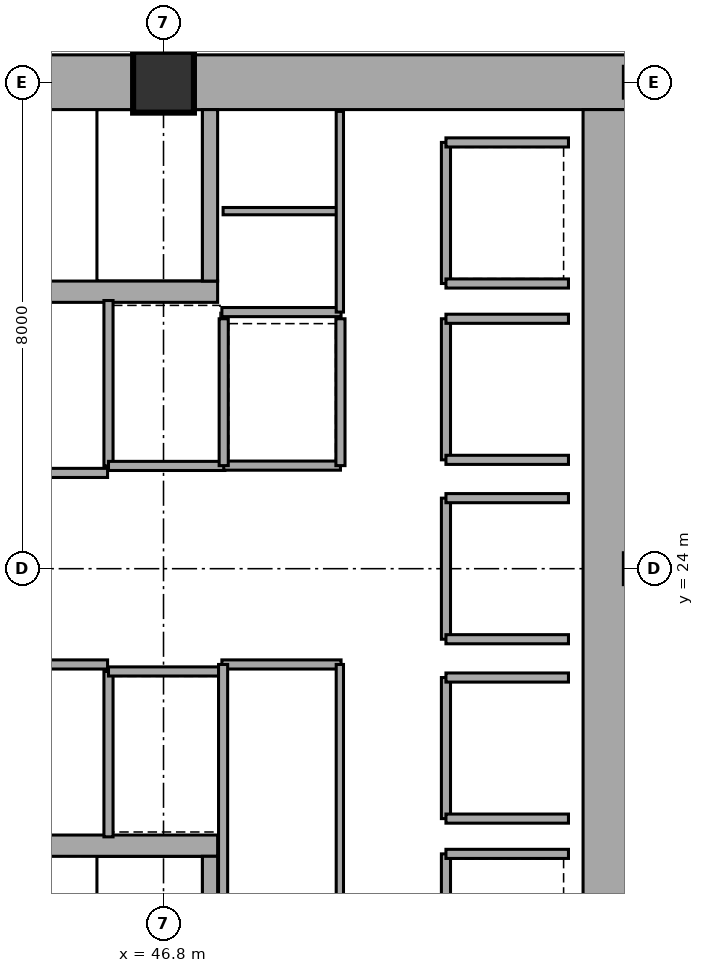
"""IFC4 building model, lengths in metres.
Left out: names, types, materials, properties, quantities, classifications, styles, units other than length and angle.
Written with IfcOpenShell. Run it as: python <this file> out.ifc"""

import sys

from ifc_helpers import new_model, si_unit, direction, frame, frame_2d, origin, origin_2d, place, context, subcontext, project, spatial, rectangle, extrude, element, fill, save


model = new_model("IFC4")
c1 = context("Model", 3, precision=1e-05, world=origin(), true_north=direction((0.0, 1.0)))
c2 = subcontext(c1, "Body", "Model", "MODEL_VIEW")
j1 = project(units=[si_unit("LENGTHUNIT", "METRE"), si_unit("PLANEANGLEUNIT", "RADIAN")], contexts=[c1])
p1 = place(None, origin())
s1 = spatial("IfcSite", under=j1, at=p1, CompositionType="ELEMENT")
p2 = place(p1, origin())
s2 = spatial("IfcBuilding", under=s1, at=p2, CompositionType="ELEMENT")
p3 = place(p2, origin())
s3 = spatial("IfcBuildingStorey", under=s2, at=p3, CompositionType="ELEMENT", Elevation=0.0)
p4 = place(p3, frame((38.8, 32.0, 0.0), z_axis=(0.0, 0.0, 1.0), x_axis=(1.0, 0.0, 0.0)))
e1 = element("IfcWall", 1, at=p4, inside=s3, PredefinedType="SHEAR", context=c2, shape_type="SweptSolid", body=[
    extrude(rectangle(XDim=16.0, YDim=0.9, at=frame_2d((8.0, 0.0))), origin(), (0.0, 0.0, 1.0), 5.12),
])
p5 = place(p3, frame((54.15, 16.45, 0.0), z_axis=(0.0, 0.0, 1.0), x_axis=(0.0, 1.0, 0.0)))
e2 = element("IfcWall", 2, at=p5, inside=s3, PredefinedType="SHEAR", context=c2, shape_type="SweptSolid", body=[
    extrude(rectangle(XDim=15.1, YDim=0.9, at=frame_2d((7.55, 0.0))), origin(), (0.0, 0.0, 1.0), 5.12),
])
p6 = place(p3, frame((39.98, 28.555, 0.0), z_axis=(0.0, 0.0, 1.0), x_axis=(1.0, 0.0, 0.0)))
e3 = element("IfcWall", 3, at=p6, inside=s3, PredefinedType="SHEAR", context=c2, shape_type="SweptSolid", body=[
    extrude(rectangle(XDim=7.71, YDim=0.35, at=frame_2d((3.855, 0.0))), origin(), (0.0, 0.0, 1.0), 5.12),
])
p7 = place(p6, frame((0.25, 0.0, 0.0)))
e4 = element("IfcOpeningElement", 4, at=p7, cuts=e3, PredefinedType="OPENING", context=c2, shape_type="SweptSolid", body=[
    extrude(rectangle(XDim=1.1, YDim=2.15, at=frame_2d((0.55, 1.075))), frame((0.0, 0.185, 0.0), z_axis=(0.0, -1.0, 0.0), x_axis=(1.0, 0.0, 0.0)), (0.0, 0.0, 1.0), 0.37),
])
p8 = place(p3, frame((39.98, 19.445, 0.0), z_axis=(0.0, 0.0, 1.0), x_axis=(1.0, 0.0, 0.0)))
e5 = element("IfcWall", 5, at=p8, inside=s3, PredefinedType="SHEAR", context=c2, shape_type="SweptSolid", body=[
    extrude(rectangle(XDim=7.71, YDim=0.35, at=frame_2d((3.855, 0.0))), origin(), (0.0, 0.0, 1.0), 5.12),
])
p9 = place(p8, frame((0.25, 0.0, 0.0)))
e6 = element("IfcOpeningElement", 6, at=p9, cuts=e5, PredefinedType="OPENING", context=c2, shape_type="SweptSolid", body=[
    extrude(rectangle(XDim=1.1, YDim=2.15, at=frame_2d((0.55, 1.075))), frame((0.0, 0.185, 0.0), z_axis=(0.0, -1.0, 0.0), x_axis=(1.0, 0.0, 0.0)), (0.0, 0.0, 1.0), 0.37),
])
for number, where, z_axis, x_axis in (
    (7, (47.565, 28.73, 0.0), (0.0, 0.0, 1.0), (0.0, 1.0, 0.0)),
    (8, (47.565, 16.45, 0.0), (0.0, 0.0, 1.0), (0.0, 1.0, 0.0)),
):
    element("IfcWall", number, at=place(p3, frame(where, z_axis=z_axis, x_axis=x_axis)), inside=s3, PredefinedType="SHEAR", context=c2, shape_type="SweptSolid", body=[
        extrude(rectangle(XDim=2.82, YDim=0.25, at=frame_2d((1.41, 0.0))), origin(), (0.0, 0.0, 1.0), 5.12),
    ])
p10 = place(p3, frame((46.8, 32.0, 0.0), z_axis=(0.0, 0.0, 1.0), x_axis=(1.0, 0.0, 0.0)))
e9 = element("IfcColumn", 9, at=p10, inside=s3, PredefinedType="COLUMN", context=c2, shape_type="SweptSolid", body=[
    extrude(rectangle(XDim=1.0, YDim=1.0, at=origin_2d()), origin(), (0.0, 0.0, 1.0), 5.395),
])
p11 = place(p3, frame((39.98, 25.575, 0.0), z_axis=(0.0, 0.0, 1.0), x_axis=(1.0, 0.0, 0.0)))
e10 = element("IfcWall", 10, at=p11, inside=s3, PredefinedType="PARTITIONING", context=c2, shape_type="SweptSolid", body=[
    extrude(rectangle(XDim=5.9, YDim=0.15, at=frame_2d((2.95, 0.0))), origin(), (0.0, 0.0, 1.0), 5.12),
])
p12 = place(p11, frame((2.35, 0.0, 0.0)))
e11 = element("IfcOpeningElement", 11, at=p12, cuts=e10, PredefinedType="OPENING", context=c2, shape_type="SweptSolid", body=[
    extrude(rectangle(XDim=1.05, YDim=2.15, at=frame_2d((0.525, 1.075))), frame((0.0, 0.085, 0.0), z_axis=(0.0, -1.0, 0.0), x_axis=(1.0, 0.0, 0.0)), (0.0, 0.0, 1.0), 0.17),
])
p13 = place(p3, frame((39.98, 22.425, 0.0), z_axis=(0.0, 0.0, 1.0), x_axis=(1.0, 0.0, 0.0)))
e12 = element("IfcWall", 12, at=p13, inside=s3, PredefinedType="PARTITIONING", context=c2, shape_type="SweptSolid", body=[
    extrude(rectangle(XDim=5.9, YDim=0.15, at=frame_2d((2.95, 0.0))), origin(), (0.0, 0.0, 1.0), 5.12),
])
p14 = place(p13, frame((2.35, 0.0, 0.0)))
e13 = element("IfcOpeningElement", 13, at=p14, cuts=e12, PredefinedType="OPENING", context=c2, shape_type="SweptSolid", body=[
    extrude(rectangle(XDim=1.05, YDim=2.15, at=frame_2d((0.525, 1.075))), frame((0.0, 0.085, 0.0), z_axis=(0.0, -1.0, 0.0), x_axis=(1.0, 0.0, 0.0)), (0.0, 0.0, 1.0), 0.17),
])
p15 = place(p3, frame((45.895, 25.69, 0.0), z_axis=(0.0, 0.0, 1.0), x_axis=(0.0, 1.0, 0.0)))
e14 = element("IfcWall", 14, at=p15, inside=s3, PredefinedType="PARTITIONING", context=c2, shape_type="SweptSolid", body=[
    extrude(rectangle(XDim=2.72, YDim=0.15, at=frame_2d((1.36, 0.0))), origin(), (0.0, 0.0, 1.0), 5.12),
])
p16 = place(p15, frame((0.81, 0.0, 0.0)))
e15 = element("IfcOpeningElement", 15, at=p16, cuts=e14, PredefinedType="OPENING", context=c2, shape_type="SweptSolid", body=[
    extrude(rectangle(XDim=1.1, YDim=2.15, at=frame_2d((0.55, 1.075))), frame((0.0, 0.085, 0.0), z_axis=(0.0, -1.0, 0.0), x_axis=(1.0, 0.0, 0.0)), (0.0, 0.0, 1.0), 0.17),
])
p17 = place(p3, frame((45.895, 25.69, 0.0), z_axis=(0.0, 0.0, 1.0), x_axis=(1.0, 0.0, 0.0)))
e16 = element("IfcWall", 16, at=p17, inside=s3, PredefinedType="PARTITIONING", context=c2, shape_type="SweptSolid", body=[
    extrude(rectangle(XDim=1.915, YDim=0.15, at=frame_2d((0.958, 0.0))), origin(), (0.0, 0.0, 1.0), 5.12),
])
p18 = place(p3, frame((45.895, 19.59, 0.0), z_axis=(0.0, 0.0, 1.0), x_axis=(0.0, 1.0, 0.0)))
e17 = element("IfcWall", 17, at=p18, inside=s3, PredefinedType="PARTITIONING", context=c2, shape_type="SweptSolid", body=[
    extrude(rectangle(XDim=2.72, YDim=0.15, at=frame_2d((1.36, 0.0))), origin(), (0.0, 0.0, 1.0), 5.12),
])
p19 = place(p18, frame((0.81, 0.0, 0.0)))
e18 = element("IfcOpeningElement", 18, at=p19, cuts=e17, PredefinedType="OPENING", context=c2, shape_type="SweptSolid", body=[
    extrude(rectangle(XDim=1.1, YDim=2.15, at=frame_2d((0.55, 1.075))), frame((0.0, 0.085, 0.0), z_axis=(0.0, -1.0, 0.0), x_axis=(1.0, 0.0, 0.0)), (0.0, 0.0, 1.0), 0.17),
])
p20 = place(p3, frame((45.895, 22.31, 0.0), z_axis=(0.0, 0.0, 1.0), x_axis=(1.0, 0.0, 0.0)))
e19 = element("IfcWall", 19, at=p20, inside=s3, PredefinedType="PARTITIONING", context=c2, shape_type="SweptSolid", body=[
    extrude(rectangle(XDim=1.915, YDim=0.15, at=frame_2d((0.958, 0.0))), origin(), (0.0, 0.0, 1.0), 5.12),
])
p21 = place(p3, frame((47.79, 25.695, 0.0), z_axis=(0.0, 0.0, 1.0), x_axis=(1.0, 0.0, 0.0)))
e20 = element("IfcWall", 20, at=p21, inside=s3, PredefinedType="PARTITIONING", context=c2, shape_type="SweptSolid", body=[
    extrude(rectangle(XDim=1.92, YDim=0.15, at=frame_2d((0.96, 0.0))), origin(), (0.0, 0.0, 1.0), 5.12),
])
p22 = place(p21, frame((0.41, 0.0, 0.0)))
e21 = element("IfcOpeningElement", 21, at=p22, cuts=e20, PredefinedType="OPENING", context=c2, shape_type="SweptSolid", body=[
    extrude(rectangle(XDim=1.1, YDim=2.15, at=frame_2d((0.55, 1.075))), frame((0.0, 0.085, 0.0), z_axis=(0.0, -1.0, 0.0), x_axis=(1.0, 0.0, 0.0)), (0.0, 0.0, 1.0), 0.17),
])
for number, where, z_axis, x_axis in (
    (22, (47.79, 25.695, 0.0), (0.0, 0.0, 1.0), (0.0, 1.0, 0.0)),
    (23, (49.71, 25.695, 0.0), (0.0, 0.0, 1.0), (0.0, 1.0, 0.0)),
):
    element("IfcWall", number, at=place(p3, frame(where, z_axis=z_axis, x_axis=x_axis)), inside=s3, PredefinedType="PARTITIONING", context=c2, shape_type="SweptSolid", body=[
        extrude(rectangle(XDim=2.415, YDim=0.15, at=frame_2d((1.208, 0.0))), origin(), (0.0, 0.0, 1.0), 5.12),
    ])
p23 = place(p3, frame((51.445, 28.69, 0.0), z_axis=(0.0, 0.0, 1.0), x_axis=(0.0, 1.0, 0.0)))
e24 = element("IfcWall", 24, at=p23, inside=s3, PredefinedType="PARTITIONING", context=c2, shape_type="SweptSolid", body=[
    extrude(rectangle(XDim=2.32, YDim=0.15, at=frame_2d((1.16, 0.0))), origin(), (0.0, 0.0, 1.0), 5.12),
])
p24 = place(p23, frame((0.61, 0.0, 0.0)))
e25 = element("IfcOpeningElement", 25, at=p24, cuts=e24, PredefinedType="OPENING", context=c2, shape_type="SweptSolid", body=[
    extrude(rectangle(XDim=1.1, YDim=2.15, at=frame_2d((0.55, 1.075))), frame((0.0, 0.085, 0.0), z_axis=(0.0, -1.0, 0.0), x_axis=(1.0, 0.0, 0.0)), (0.0, 0.0, 1.0), 0.17),
])
for number, where, z_axis, x_axis in (
    (26, (51.445, 28.69, 0.0), (0.0, 0.0, 1.0), (1.0, 0.0, 0.0)),
    (27, (51.445, 31.01, 0.0), (0.0, 0.0, 1.0), (1.0, 0.0, 0.0)),
):
    element("IfcWall", number, at=place(p3, frame(where, z_axis=z_axis, x_axis=x_axis)), inside=s3, PredefinedType="PARTITIONING", context=c2, shape_type="SweptSolid", body=[
        extrude(rectangle(XDim=2.015, YDim=0.15, at=frame_2d((1.007, 0.0))), origin(), (0.0, 0.0, 1.0), 5.12),
    ])
p25 = place(p3, frame((51.445, 25.79, 0.0), z_axis=(0.0, 0.0, 1.0), x_axis=(0.0, 1.0, 0.0)))
e28 = element("IfcWall", 28, at=p25, inside=s3, PredefinedType="PARTITIONING", context=c2, shape_type="SweptSolid", body=[
    extrude(rectangle(XDim=2.32, YDim=0.15, at=frame_2d((1.16, 0.0))), origin(), (0.0, 0.0, 1.0), 5.12),
])
p26 = place(p25, frame((0.61, 0.0, 0.0)))
e29 = element("IfcOpeningElement", 29, at=p26, cuts=e28, PredefinedType="OPENING", context=c2, shape_type="SweptSolid", body=[
    extrude(rectangle(XDim=1.1, YDim=2.15, at=frame_2d((0.55, 1.075))), frame((0.0, 0.085, 0.0), z_axis=(0.0, -1.0, 0.0), x_axis=(1.0, 0.0, 0.0)), (0.0, 0.0, 1.0), 0.17),
])
for number, where, z_axis, x_axis in (
    (30, (51.445, 25.79, 0.0), (0.0, 0.0, 1.0), (1.0, 0.0, 0.0)),
    (31, (51.445, 28.11, 0.0), (0.0, 0.0, 1.0), (1.0, 0.0, 0.0)),
):
    element("IfcWall", number, at=place(p3, frame(where, z_axis=z_axis, x_axis=x_axis)), inside=s3, PredefinedType="PARTITIONING", context=c2, shape_type="SweptSolid", body=[
        extrude(rectangle(XDim=2.015, YDim=0.15, at=frame_2d((1.007, 0.0))), origin(), (0.0, 0.0, 1.0), 5.12),
    ])
p27 = place(p3, frame((51.445, 19.89, 0.0), z_axis=(0.0, 0.0, 1.0), x_axis=(0.0, 1.0, 0.0)))
e32 = element("IfcWall", 32, at=p27, inside=s3, PredefinedType="PARTITIONING", context=c2, shape_type="SweptSolid", body=[
    extrude(rectangle(XDim=2.32, YDim=0.15, at=frame_2d((1.16, 0.0))), origin(), (0.0, 0.0, 1.0), 5.12),
])
p28 = place(p27, frame((0.61, 0.0, 0.0)))
e33 = element("IfcOpeningElement", 33, at=p28, cuts=e32, PredefinedType="OPENING", context=c2, shape_type="SweptSolid", body=[
    extrude(rectangle(XDim=1.1, YDim=2.15, at=frame_2d((0.55, 1.075))), frame((0.0, 0.085, 0.0), z_axis=(0.0, -1.0, 0.0), x_axis=(1.0, 0.0, 0.0)), (0.0, 0.0, 1.0), 0.17),
])
for number, where, z_axis, x_axis in (
    (34, (51.445, 19.89, 0.0), (0.0, 0.0, 1.0), (1.0, 0.0, 0.0)),
    (35, (51.445, 22.21, 0.0), (0.0, 0.0, 1.0), (1.0, 0.0, 0.0)),
):
    element("IfcWall", number, at=place(p3, frame(where, z_axis=z_axis, x_axis=x_axis)), inside=s3, PredefinedType="PARTITIONING", context=c2, shape_type="SweptSolid", body=[
        extrude(rectangle(XDim=2.015, YDim=0.15, at=frame_2d((1.007, 0.0))), origin(), (0.0, 0.0, 1.0), 5.12),
    ])
p29 = place(p3, frame((51.445, 22.84, 0.0), z_axis=(0.0, 0.0, 1.0), x_axis=(0.0, 1.0, 0.0)))
e36 = element("IfcWall", 36, at=p29, inside=s3, PredefinedType="PARTITIONING", context=c2, shape_type="SweptSolid", body=[
    extrude(rectangle(XDim=2.32, YDim=0.15, at=frame_2d((1.16, 0.0))), origin(), (0.0, 0.0, 1.0), 5.12),
])
p30 = place(p29, frame((0.61, 0.0, 0.0)))
e37 = element("IfcOpeningElement", 37, at=p30, cuts=e36, PredefinedType="OPENING", context=c2, shape_type="SweptSolid", body=[
    extrude(rectangle(XDim=1.1, YDim=2.15, at=frame_2d((0.55, 1.075))), frame((0.0, 0.085, 0.0), z_axis=(0.0, -1.0, 0.0), x_axis=(1.0, 0.0, 0.0)), (0.0, 0.0, 1.0), 0.17),
])
for number, where, z_axis, x_axis in (
    (38, (51.445, 22.84, 0.0), (0.0, 0.0, 1.0), (1.0, 0.0, 0.0)),
    (39, (51.445, 25.16, 0.0), (0.0, 0.0, 1.0), (1.0, 0.0, 0.0)),
):
    element("IfcWall", number, at=place(p3, frame(where, z_axis=z_axis, x_axis=x_axis)), inside=s3, PredefinedType="PARTITIONING", context=c2, shape_type="SweptSolid", body=[
        extrude(rectangle(XDim=2.015, YDim=0.15, at=frame_2d((1.007, 0.0))), origin(), (0.0, 0.0, 1.0), 5.12),
    ])
p31 = place(p3, frame((51.445, 16.99, 0.0), z_axis=(0.0, 0.0, 1.0), x_axis=(0.0, 1.0, 0.0)))
e40 = element("IfcWall", 40, at=p31, inside=s3, PredefinedType="PARTITIONING", context=c2, shape_type="SweptSolid", body=[
    extrude(rectangle(XDim=2.32, YDim=0.15, at=frame_2d((1.16, 0.0))), origin(), (0.0, 0.0, 1.0), 5.12),
])
p32 = place(p31, frame((0.61, 0.0, 0.0)))
e41 = element("IfcOpeningElement", 41, at=p32, cuts=e40, PredefinedType="OPENING", context=c2, shape_type="SweptSolid", body=[
    extrude(rectangle(XDim=1.1, YDim=2.15, at=frame_2d((0.55, 1.075))), frame((0.0, 0.085, 0.0), z_axis=(0.0, -1.0, 0.0), x_axis=(1.0, 0.0, 0.0)), (0.0, 0.0, 1.0), 0.17),
])
p33 = place(p3, frame((51.445, 19.31, 0.0), z_axis=(0.0, 0.0, 1.0), x_axis=(1.0, 0.0, 0.0)))
e42 = element("IfcWall", 42, at=p33, inside=s3, PredefinedType="PARTITIONING", context=c2, shape_type="SweptSolid", body=[
    extrude(rectangle(XDim=2.015, YDim=0.15, at=frame_2d((1.007, 0.0))), origin(), (0.0, 0.0, 1.0), 5.12),
])
p34 = place(p3, frame((47.76, 22.425, 0.0), z_axis=(0.0, 0.0, 1.0), x_axis=(1.0, 0.0, 0.0)))
e43 = element("IfcWall", 43, at=p34, inside=s3, PredefinedType="PARTITIONING", context=c2, shape_type="SweptSolid", body=[
    extrude(rectangle(XDim=1.96, YDim=0.15, at=frame_2d((0.98, 0.0))), origin(), (0.0, 0.0, 1.0), 5.12),
])
p35 = place(p3, frame((47.78, 16.45, 0.0), z_axis=(0.0, 0.0, 1.0), x_axis=(0.0, 1.0, 0.0)))
e44 = element("IfcWall", 44, at=p35, inside=s3, PredefinedType="PARTITIONING", context=c2, shape_type="SweptSolid", body=[
    extrude(rectangle(XDim=5.975, YDim=0.15, at=frame_2d((2.988, 0.0))), origin(), (0.0, 0.0, 1.0), 5.12),
])
p36 = place(p3, frame((49.7, 16.48, 0.0), z_axis=(0.0, 0.0, 1.0), x_axis=(0.0, 1.0, 0.0)))
e45 = element("IfcWall", 45, at=p36, inside=s3, PredefinedType="PARTITIONING", context=c2, shape_type="SweptSolid", body=[
    extrude(rectangle(XDim=5.945, YDim=0.12, at=frame_2d((2.973, 0.0))), origin(), (0.0, 0.0, 1.0), 5.12),
])
p37 = place(p36, frame((3.35, 0.0, 0.0)))
e46 = element("IfcOpeningElement", 46, at=p37, cuts=e45, PredefinedType="OPENING", context=c2, shape_type="SweptSolid", body=[
    extrude(rectangle(XDim=0.95, YDim=2.15, at=frame_2d((0.475, 1.075))), frame((0.0, 0.07, 0.0), z_axis=(0.0, -1.0, 0.0), x_axis=(1.0, 0.0, 0.0)), (0.0, 0.0, 1.0), 0.14),
])
p38 = place(p3, frame((47.76, 28.22, 0.0), z_axis=(0.0, 0.0, 1.0), x_axis=(1.0, 0.0, 0.0)))
e47 = element("IfcWall", 47, at=p38, inside=s3, PredefinedType="PARTITIONING", context=c2, shape_type="SweptSolid", body=[
    extrude(rectangle(XDim=1.96, YDim=0.15, at=frame_2d((0.98, 0.0))), origin(), (0.0, 0.0, 1.0), 5.12),
])
p39 = place(p3, frame((47.78, 29.88, 0.0), z_axis=(0.0, 0.0, 1.0), x_axis=(1.0, 0.0, 0.0)))
e48 = element("IfcWall", 48, at=p39, inside=s3, PredefinedType="PARTITIONING", context=c2, shape_type="SweptSolid", body=[
    extrude(rectangle(XDim=1.92, YDim=0.12, at=frame_2d((0.96, 0.0))), origin(), (0.0, 0.0, 1.0), 5.12),
])
p40 = place(p3, frame((49.7, 28.22, 0.0), z_axis=(0.0, 0.0, 1.0), x_axis=(0.0, 1.0, 0.0)))
e49 = element("IfcWall", 49, at=p40, inside=s3, PredefinedType="PARTITIONING", context=c2, shape_type="SweptSolid", body=[
    extrude(rectangle(XDim=3.3, YDim=0.12, at=frame_2d((1.65, 0.0))), origin(), (0.0, 0.0, 1.0), 5.12),
])
p41 = place(p40, frame((0.42, 0.0, 0.0)))
e50 = element("IfcOpeningElement", 50, at=p41, cuts=e49, PredefinedType="OPENING", context=c2, shape_type="SweptSolid", body=[
    extrude(rectangle(XDim=0.85, YDim=2.15, at=frame_2d((0.425, 1.075))), frame((0.0, 0.07, 0.0), z_axis=(0.0, -1.0, 0.0), x_axis=(1.0, 0.0, 0.0)), (0.0, 0.0, 1.0), 0.14),
])
p42 = place(p40, frame((1.98, 0.0, 0.0)))
e51 = element("IfcOpeningElement", 51, at=p42, cuts=e49, PredefinedType="OPENING", context=c2, shape_type="SweptSolid", body=[
    extrude(rectangle(XDim=0.85, YDim=2.15, at=frame_2d((0.425, 1.075))), frame((0.0, 0.07, 0.0), z_axis=(0.0, -1.0, 0.0), x_axis=(1.0, 0.0, 0.0)), (0.0, 0.0, 1.0), 0.14),
])
p43 = place(p16, frame((1.1, 0.0, 0.0), z_axis=(0.0, 0.0, 1.0), x_axis=(-1.0, 0.0, 0.0)))
e52 = element("IfcDoor", 52, at=p43, inside=s3, OperationType="DOUBLE_DOOR_SLIDING", PredefinedType="DOOR", context=c2, shape_type="SweptSolid", body=[
    extrude(rectangle(XDim=1.1, YDim=2.15, at=frame_2d((0.55, 1.075))), frame((0.0, 0.025, 0.0), z_axis=(0.0, -1.0, 0.0), x_axis=(1.0, 0.0, 0.0)), (0.0, 0.0, 1.0), 0.05),
])
fill(e15, e52)
p44 = place(p19, frame((1.1, 0.0, 0.0), z_axis=(0.0, 0.0, 1.0), x_axis=(-1.0, 0.0, 0.0)))
e53 = element("IfcDoor", 53, at=p44, inside=s3, OperationType="DOUBLE_DOOR_SLIDING", PredefinedType="DOOR", context=c2, shape_type="SweptSolid", body=[
    extrude(rectangle(XDim=1.1, YDim=2.15, at=frame_2d((0.55, 1.075))), frame((0.0, 0.025, 0.0), z_axis=(0.0, -1.0, 0.0), x_axis=(1.0, 0.0, 0.0)), (0.0, 0.0, 1.0), 0.05),
])
fill(e18, e53)
p45 = place(p22, frame((1.1, 0.0, 0.0), z_axis=(0.0, 0.0, 1.0), x_axis=(-1.0, 0.0, 0.0)))
e54 = element("IfcDoor", 54, at=p45, inside=s3, OperationType="DOUBLE_DOOR_SLIDING", PredefinedType="DOOR", context=c2, shape_type="SweptSolid", body=[
    extrude(rectangle(XDim=1.1, YDim=2.15, at=frame_2d((0.55, 1.075))), frame((0.0, 0.025, 0.0), z_axis=(0.0, -1.0, 0.0), x_axis=(1.0, 0.0, 0.0)), (0.0, 0.0, 1.0), 0.05),
])
fill(e21, e54)
p46 = place(p24, frame((1.1, 0.0, 0.0), z_axis=(0.0, 0.0, 1.0), x_axis=(-1.0, 0.0, 0.0)))
e55 = element("IfcDoor", 55, at=p46, inside=s3, OperationType="DOUBLE_DOOR_SLIDING", PredefinedType="DOOR", context=c2, shape_type="SweptSolid", body=[
    extrude(rectangle(XDim=1.1, YDim=2.15, at=frame_2d((0.55, 1.075))), frame((0.0, 0.025, 0.0), z_axis=(0.0, -1.0, 0.0), x_axis=(1.0, 0.0, 0.0)), (0.0, 0.0, 1.0), 0.05),
])
fill(e25, e55)
p47 = place(p26, frame((1.1, 0.0, 0.0), z_axis=(0.0, 0.0, 1.0), x_axis=(-1.0, 0.0, 0.0)))
e56 = element("IfcDoor", 56, at=p47, inside=s3, OperationType="DOUBLE_DOOR_SLIDING", PredefinedType="DOOR", context=c2, shape_type="SweptSolid", body=[
    extrude(rectangle(XDim=1.1, YDim=2.15, at=frame_2d((0.55, 1.075))), frame((0.0, 0.025, 0.0), z_axis=(0.0, -1.0, 0.0), x_axis=(1.0, 0.0, 0.0)), (0.0, 0.0, 1.0), 0.05),
])
fill(e29, e56)
p48 = place(p28, frame((1.1, 0.0, 0.0), z_axis=(0.0, 0.0, 1.0), x_axis=(-1.0, 0.0, 0.0)))
e57 = element("IfcDoor", 57, at=p48, inside=s3, OperationType="DOUBLE_DOOR_SLIDING", PredefinedType="DOOR", context=c2, shape_type="SweptSolid", body=[
    extrude(rectangle(XDim=1.1, YDim=2.15, at=frame_2d((0.55, 1.075))), frame((0.0, 0.025, 0.0), z_axis=(0.0, -1.0, 0.0), x_axis=(1.0, 0.0, 0.0)), (0.0, 0.0, 1.0), 0.05),
])
fill(e33, e57)
p49 = place(p30, frame((1.1, 0.0, 0.0), z_axis=(0.0, 0.0, 1.0), x_axis=(-1.0, 0.0, 0.0)))
e58 = element("IfcDoor", 58, at=p49, inside=s3, OperationType="DOUBLE_DOOR_SLIDING", PredefinedType="DOOR", context=c2, shape_type="SweptSolid", body=[
    extrude(rectangle(XDim=1.1, YDim=2.15, at=frame_2d((0.55, 1.075))), frame((0.0, 0.025, 0.0), z_axis=(0.0, -1.0, 0.0), x_axis=(1.0, 0.0, 0.0)), (0.0, 0.0, 1.0), 0.05),
])
fill(e37, e58)
p50 = place(p32, frame((1.1, 0.0, 0.0), z_axis=(0.0, 0.0, 1.0), x_axis=(-1.0, 0.0, 0.0)))
e59 = element("IfcDoor", 59, at=p50, inside=s3, OperationType="DOUBLE_DOOR_SLIDING", PredefinedType="DOOR", context=c2, shape_type="SweptSolid", body=[
    extrude(rectangle(XDim=1.1, YDim=2.15, at=frame_2d((0.55, 1.075))), frame((0.0, 0.025, 0.0), z_axis=(0.0, -1.0, 0.0), x_axis=(1.0, 0.0, 0.0)), (0.0, 0.0, 1.0), 0.05),
])
fill(e41, e59)
p51 = place(p37, frame((0.95, 0.0, 0.0), z_axis=(0.0, 0.0, 1.0), x_axis=(-1.0, 0.0, 0.0)))
e60 = element("IfcDoor", 60, at=p51, inside=s3, OperationType="SINGLE_SWING_LEFT", PredefinedType="DOOR", context=c2, shape_type="SweptSolid", body=[
    extrude(rectangle(XDim=0.95, YDim=2.15, at=frame_2d((0.475, 1.075))), frame((0.0, 0.025, 0.0), z_axis=(0.0, -1.0, 0.0), x_axis=(1.0, 0.0, 0.0)), (0.0, 0.0, 1.0), 0.05),
])
fill(e46, e60)
p52 = place(p41, frame((0.85, 0.0, 0.0), z_axis=(0.0, 0.0, 1.0), x_axis=(-1.0, 0.0, 0.0)))
e61 = element("IfcDoor", 61, at=p52, inside=s3, OperationType="SINGLE_SWING_LEFT", PredefinedType="DOOR", context=c2, shape_type="SweptSolid", body=[
    extrude(rectangle(XDim=0.85, YDim=2.15, at=frame_2d((0.425, 1.075))), frame((0.0, 0.025, 0.0), z_axis=(0.0, -1.0, 0.0), x_axis=(1.0, 0.0, 0.0)), (0.0, 0.0, 1.0), 0.05),
])
fill(e50, e61)
p53 = place(p42, frame((0.85, 0.0, 0.0), z_axis=(0.0, 0.0, 1.0), x_axis=(-1.0, 0.0, 0.0)))
e62 = element("IfcDoor", 62, at=p53, inside=s3, OperationType="SINGLE_SWING_RIGHT", PredefinedType="DOOR", context=c2, shape_type="SweptSolid", body=[
    extrude(rectangle(XDim=0.85, YDim=2.15, at=frame_2d((0.425, 1.075))), frame((0.0, 0.025, 0.0), z_axis=(0.0, -1.0, 0.0), x_axis=(1.0, 0.0, 0.0)), (0.0, 0.0, 1.0), 0.05),
])
fill(e51, e62)
save(model, sys.argv[1])
